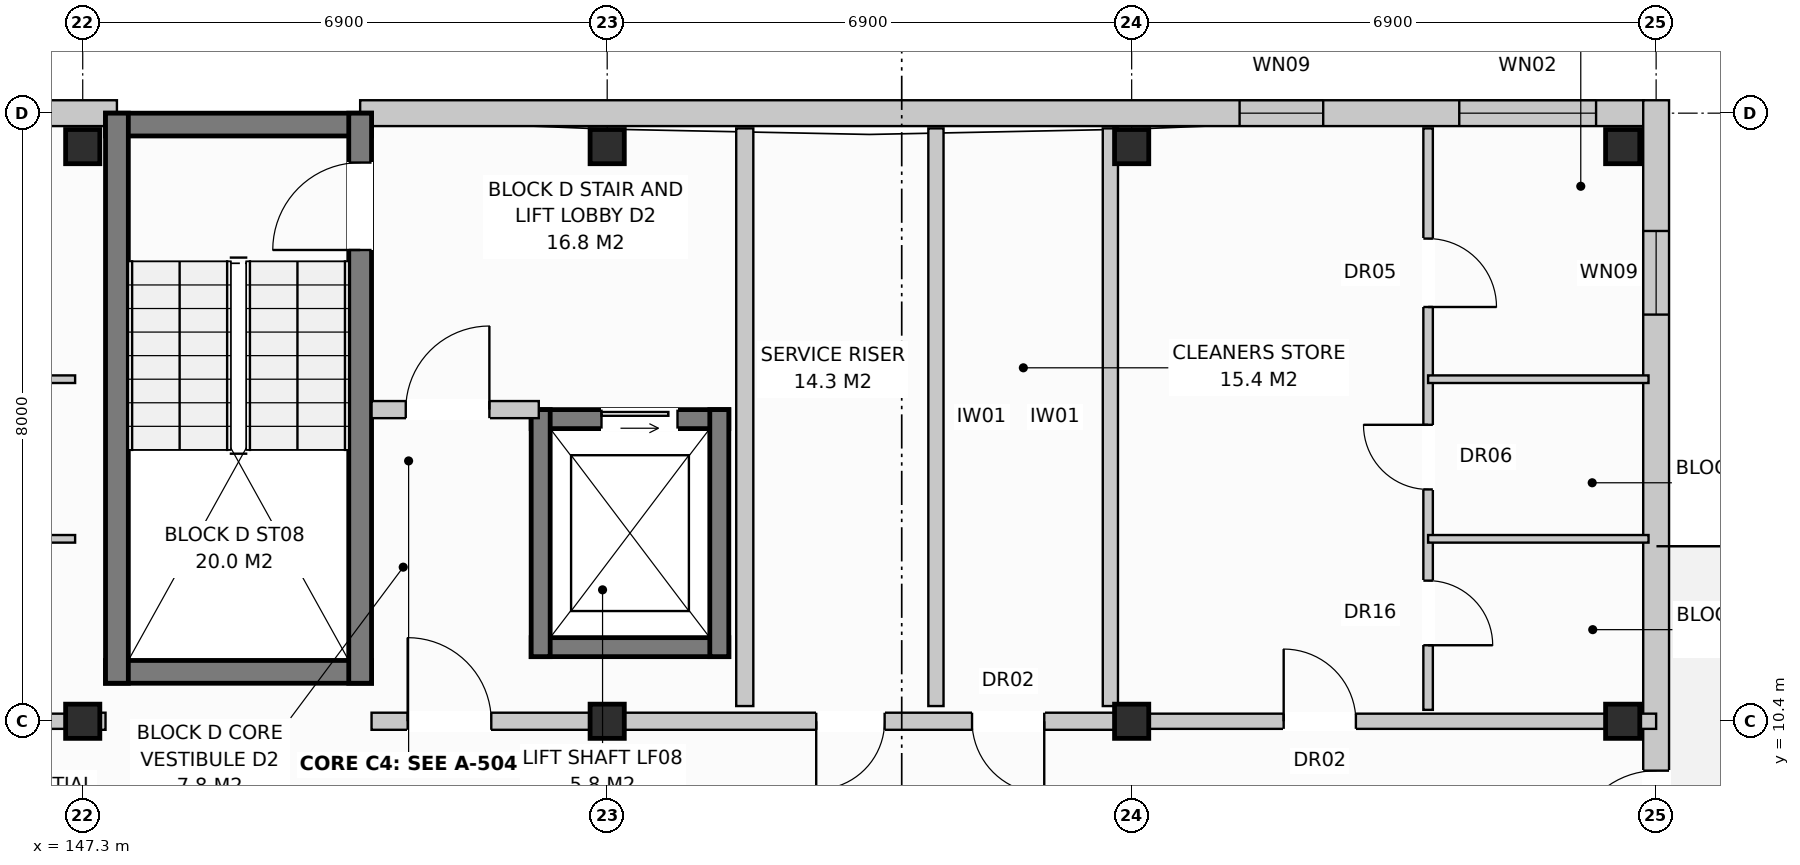
"""IFC4 building model, lengths in metres.
Left out: names, types, materials, properties, quantities, classifications, styles, units other than length and angle.
Written with IfcOpenShell. Run it as: python <this file> out.ifc"""

import sys

from ifc_helpers import new_model, si_unit, direction, frame, frame_2d, origin, origin_with_axes, origin_2d, place, context, subcontext, project, spatial, rectangle, extrude, element, fill, save


model = new_model("IFC4")
c1 = context("Model", 3, precision=1e-05, world=origin(), true_north=direction((0.0, 1.0)))
c2 = subcontext(c1, "Body", "Model", "MODEL_VIEW")
j1 = project(units=[si_unit("LENGTHUNIT", "METRE"), si_unit("PLANEANGLEUNIT", "RADIAN")], contexts=[c1])
p1 = place(None, origin())
s1 = spatial("IfcSite", under=j1, at=p1, CompositionType="ELEMENT")
p2 = place(p1, origin())
s2 = spatial("IfcBuilding", under=s1, at=p2, CompositionType="ELEMENT")
p3 = place(p2, frame((0.0, 0.0, 24.0)))
s3 = spatial("IfcBuildingStorey", under=s2, at=p3, CompositionType="ELEMENT", Elevation=24.0)
for number, where, z_axis, x_axis in (
    (1, (147.3, 10.4, 0.0), (0.0, 0.0, 1.0), (1.0, 0.0, 0.0)),
    (2, (147.3, 17.96, 0.0), (0.0, 0.0, 1.0), (1.0, 0.0, 0.0)),
    (3, (154.2, 10.4, 0.0), (0.0, 0.0, 1.0), (1.0, 0.0, 0.0)),
    (4, (154.2, 17.96, 0.0), (0.0, 0.0, 1.0), (1.0, 0.0, 0.0)),
    (5, (161.1, 10.4, 0.0), (0.0, 0.0, 1.0), (1.0, 0.0, 0.0)),
    (6, (161.1, 17.96, 0.0), (0.0, 0.0, 1.0), (1.0, 0.0, 0.0)),
    (7, (167.56, 10.4, 0.0), (0.0, 0.0, 1.0), (1.0, 0.0, 0.0)),
    (8, (167.56, 17.96, 0.0), (0.0, 0.0, 1.0), (1.0, 0.0, 0.0)),
):
    element("IfcColumn", number, at=place(p3, frame(where, z_axis=z_axis, x_axis=x_axis)), inside=s3, PredefinedType="COLUMN", context=c2, shape_type="SweptSolid", body=[
        extrude(rectangle(XDim=0.45, YDim=0.45, at=origin_2d()), origin(), (0.0, 0.0, 1.0), 3.2),
    ])
p4 = place(p3, frame((130.25, 18.4, 0.0), z_axis=(0.0, 0.0, 1.0), x_axis=(1.0, 0.0, 0.0)))
e9 = element("IfcWall", 9, at=p4, inside=s3, PredefinedType="STANDARD", context=c2, shape_type="SweptSolid", body=[
    extrude(rectangle(XDim=17.5, YDim=0.34, at=frame_2d((8.75, 0.0))), origin(), (0.0, 0.0, 1.0), 2.95),
])
p5 = place(p4, frame((11.921, 0.0, 0.0)))
e10 = element("IfcOpeningElement", 10, at=p5, cuts=e9, PredefinedType="OPENING", context=c2, shape_type="SweptSolid", body=[
    extrude(rectangle(XDim=1.05, YDim=2.12, at=frame_2d((0.525, 1.06))), frame((0.0, 0.182, 0.0), z_axis=(0.0, -1.0, 0.0), x_axis=(1.0, 0.0, 0.0)), (0.0, 0.0, 1.0), 0.364),
])
p6 = place(p4, frame((14.97, 0.0, 0.72)))
e11 = element("IfcOpeningElement", 11, at=p6, cuts=e9, PredefinedType="OPENING", context=c2, shape_type="SweptSolid", body=[
    extrude(rectangle(XDim=1.1, YDim=1.5, at=frame_2d((0.55, 0.75))), frame((0.0, 0.182, 0.0), z_axis=(0.0, -1.0, 0.0), x_axis=(1.0, 0.0, 0.0)), (0.0, 0.0, 1.0), 0.364),
])
p7 = place(p3, frame((150.95, 18.4, 0.0), z_axis=(0.0, 0.0, 1.0), x_axis=(1.0, 0.0, 0.0)))
e12 = element("IfcWall", 12, at=p7, inside=s3, PredefinedType="STANDARD", context=c2, shape_type="SweptSolid", body=[
    extrude(rectangle(XDim=16.89, YDim=0.34, at=frame_2d((8.445, 0.0))), origin(), (0.0, 0.0, 1.0), 2.95),
])
p8 = place(p7, frame((11.57, 0.0, 0.72)))
e13 = element("IfcOpeningElement", 13, at=p8, cuts=e12, PredefinedType="OPENING", context=c2, shape_type="SweptSolid", body=[
    extrude(rectangle(XDim=1.1, YDim=1.5, at=frame_2d((0.55, 0.75))), frame((0.0, 0.182, 0.0), z_axis=(0.0, -1.0, 0.0), x_axis=(1.0, 0.0, 0.0)), (0.0, 0.0, 1.0), 0.364),
])
p9 = place(p7, frame((14.46, 0.0, 0.8)))
e14 = element("IfcOpeningElement", 14, at=p9, cuts=e12, PredefinedType="OPENING", context=c2, shape_type="SweptSolid", body=[
    extrude(rectangle(XDim=1.8, YDim=1.7, at=frame_2d((0.9, 0.85))), frame((0.0, 0.182, 0.0), z_axis=(0.0, -1.0, 0.0), x_axis=(1.0, 0.0, 0.0)), (0.0, 0.0, 1.0), 0.364),
])
p10 = place(p3, frame((168.0, -0.17, 0.0), z_axis=(0.0, 0.0, 1.0), x_axis=(0.0, 1.0, 0.0)))
e15 = element("IfcWall", 15, at=p10, inside=s3, PredefinedType="STANDARD", context=c2, shape_type="SweptSolid", body=[
    extrude(rectangle(XDim=18.74, YDim=0.34, at=frame_2d((9.37, 0.0))), origin(), (0.0, 0.0, 1.0), 2.95),
])
p11 = place(p10, frame((8.82, 0.0, 0.0)))
e16 = element("IfcOpeningElement", 16, at=p11, cuts=e15, PredefinedType="OPENING", context=c2, shape_type="SweptSolid", body=[
    extrude(rectangle(XDim=1.1, YDim=2.1, at=frame_2d((0.55, 1.05))), frame((0.0, 0.182, 0.0), z_axis=(0.0, -1.0, 0.0), x_axis=(1.0, 0.0, 0.0)), (0.0, 0.0, 1.0), 0.364),
])
p12 = place(p10, frame((1.72, 0.0, 0.72)))
e17 = element("IfcOpeningElement", 17, at=p12, cuts=e15, PredefinedType="OPENING", context=c2, shape_type="SweptSolid", body=[
    extrude(rectangle(XDim=1.1, YDim=1.5, at=frame_2d((0.55, 0.75))), frame((0.0, 0.182, 0.0), z_axis=(0.0, -1.0, 0.0), x_axis=(1.0, 0.0, 0.0)), (0.0, 0.0, 1.0), 0.364),
])
p13 = place(p10, frame((15.92, 0.0, 0.72)))
e18 = element("IfcOpeningElement", 18, at=p13, cuts=e15, PredefinedType="OPENING", context=c2, shape_type="SweptSolid", body=[
    extrude(rectangle(XDim=1.1, YDim=1.5, at=frame_2d((0.55, 0.75))), frame((0.0, 0.182, 0.0), z_axis=(0.0, -1.0, 0.0), x_axis=(1.0, 0.0, 0.0)), (0.0, 0.0, 1.0), 0.364),
])
for number, where, z_axis, x_axis in (
    (19, (147.6, 18.25, 0.0), (0.0, 0.0, 1.0), (1.0, 0.0, 0.0)),
    (20, (147.6, 11.05, 0.0), (0.0, 0.0, 1.0), (1.0, 0.0, 0.0)),
):
    element("IfcWall", number, at=place(p3, frame(where, z_axis=z_axis, x_axis=x_axis)), inside=s3, PredefinedType="SHEAR", context=c2, shape_type="SweptSolid", body=[
        extrude(rectangle(XDim=3.5, YDim=0.3, at=frame_2d((1.75, 0.0))), origin(), (0.0, 0.0, 1.0), 2.95),
    ])
p14 = place(p3, frame((147.75, 10.9, 0.0), z_axis=(0.0, 0.0, 1.0), x_axis=(0.0, 1.0, 0.0)))
e21 = element("IfcWall", 21, at=p14, inside=s3, PredefinedType="SHEAR", context=c2, shape_type="SweptSolid", body=[
    extrude(rectangle(XDim=7.5, YDim=0.3, at=frame_2d((3.75, 0.0))), origin(), (0.0, 0.0, 1.0), 2.95),
])
p15 = place(p3, frame((150.95, 10.9, 0.0), z_axis=(0.0, 0.0, 1.0), x_axis=(0.0, 1.0, 0.0)))
e22 = element("IfcWall", 22, at=p15, inside=s3, PredefinedType="SHEAR", context=c2, shape_type="SweptSolid", body=[
    extrude(rectangle(XDim=7.5, YDim=0.3, at=frame_2d((3.75, 0.0))), origin(), (0.0, 0.0, 1.0), 2.95),
])
p16 = place(p15, frame((5.7, 0.0, 0.0)))
e23 = element("IfcOpeningElement", 23, at=p16, cuts=e22, PredefinedType="OPENING", context=c2, shape_type="SweptSolid", body=[
    extrude(rectangle(XDim=1.15, YDim=2.15, at=frame_2d((0.575, 1.075))), frame((0.0, 0.162, 0.0), z_axis=(0.0, -1.0, 0.0), x_axis=(1.0, 0.0, 0.0)), (0.0, 0.0, 1.0), 0.324),
])
p17 = place(p3, frame((153.2, 14.375, 0.0), z_axis=(0.0, 0.0, 1.0), x_axis=(1.0, 0.0, 0.0)))
e24 = element("IfcWall", 24, at=p17, inside=s3, PredefinedType="SHEAR", context=c2, shape_type="SweptSolid", body=[
    extrude(rectangle(XDim=2.6, YDim=0.25, at=frame_2d((1.3, 0.0))), origin(), (0.0, 0.0, 1.0), 2.95),
])
p18 = place(p17, frame((0.925, 0.0, 0.0)))
e25 = element("IfcOpeningElement", 25, at=p18, cuts=e24, PredefinedType="OPENING", context=c2, shape_type="SweptSolid", body=[
    extrude(rectangle(XDim=1.0, YDim=2.1, at=frame_2d((0.5, 1.05))), frame((0.0, 0.137, 0.0), z_axis=(0.0, -1.0, 0.0), x_axis=(1.0, 0.0, 0.0)), (0.0, 0.0, 1.0), 0.274),
])
p19 = place(p3, frame((153.2, 11.375, 0.0), z_axis=(0.0, 0.0, 1.0), x_axis=(1.0, 0.0, 0.0)))
e26 = element("IfcWall", 26, at=p19, inside=s3, PredefinedType="SHEAR", context=c2, shape_type="SweptSolid", body=[
    extrude(rectangle(XDim=2.6, YDim=0.25, at=frame_2d((1.3, 0.0))), origin(), (0.0, 0.0, 1.0), 2.95),
])
for number, where, z_axis, x_axis in (
    (27, (153.325, 11.25, 0.0), (0.0, 0.0, 1.0), (0.0, 1.0, 0.0)),
    (28, (155.675, 11.25, 0.0), (0.0, 0.0, 1.0), (0.0, 1.0, 0.0)),
):
    element("IfcWall", number, at=place(p3, frame(where, z_axis=z_axis, x_axis=x_axis)), inside=s3, PredefinedType="SHEAR", context=c2, shape_type="SweptSolid", body=[
        extrude(rectangle(XDim=3.25, YDim=0.25, at=frame_2d((1.625, 0.0))), origin(), (0.0, 0.0, 1.0), 2.95),
    ])
p20 = place(p3, frame((156.01, 10.6, 0.0), z_axis=(0.0, 0.0, 1.0), x_axis=(0.0, 1.0, 0.0)))
e29 = element("IfcWall", 29, at=p20, inside=s3, PredefinedType="PARTITIONING", context=c2, shape_type="SweptSolid", body=[
    extrude(rectangle(XDim=7.6, YDim=0.225, at=frame_2d((3.8, 0.0))), origin(), (0.0, 0.0, 1.0), 2.59),
])
p21 = place(p3, frame((151.1, 14.5, 0.0), z_axis=(0.0, 0.0, 1.0), x_axis=(1.0, 0.0, 0.0)))
e30 = element("IfcWall", 30, at=p21, inside=s3, PredefinedType="PARTITIONING", context=c2, shape_type="SweptSolid", body=[
    extrude(rectangle(XDim=2.2, YDim=0.225, at=frame_2d((1.1, 0.0))), origin(), (0.0, 0.0, 1.0), 2.95),
])
p22 = place(p21, frame((0.45, 0.0, 0.0)))
e31 = element("IfcOpeningElement", 31, at=p22, cuts=e30, PredefinedType="OPENING", context=c2, shape_type="SweptSolid", body=[
    extrude(rectangle(XDim=1.1, YDim=2.15, at=frame_2d((0.55, 1.075))), frame((0.0, 0.125, 0.0), z_axis=(0.0, -1.0, 0.0), x_axis=(1.0, 0.0, 0.0)), (0.0, 0.0, 1.0), 0.249),
])
p23 = place(p3, frame((147.3, 10.4, 0.0), z_axis=(0.0, 0.0, 1.0), x_axis=(1.0, 0.0, 0.0)))
e32 = element("IfcWall", 32, at=p23, inside=s3, PredefinedType="PARTITIONING", context=c2, shape_type="SweptSolid", body=[
    extrude(rectangle(XDim=0.3, YDim=0.225, at=frame_2d((0.15, 0.0))), origin(), (0.0, 0.0, 1.0), 2.95),
])
p24 = place(p3, frame((158.525, 10.6, 0.0), z_axis=(0.0, 0.0, 1.0), x_axis=(0.0, 1.0, 0.0)))
e33 = element("IfcWall", 33, at=p24, inside=s3, PredefinedType="PARTITIONING", context=c2, shape_type="SweptSolid", body=[
    extrude(rectangle(XDim=7.6, YDim=0.2, at=frame_2d((3.8, 0.0))), origin(), (0.0, 0.0, 1.0), 2.59),
])
p25 = place(p3, frame((160.82, 10.6, 0.0), z_axis=(0.0, 0.0, 1.0), x_axis=(0.0, 1.0, 0.0)))
e34 = element("IfcWall", 34, at=p25, inside=s3, PredefinedType="PARTITIONING", context=c2, shape_type="SweptSolid", body=[
    extrude(rectangle(XDim=7.6, YDim=0.2, at=frame_2d((3.8, 0.0))), origin(), (0.0, 0.0, 1.0), 2.39),
])
p26 = place(p3, frame((151.1, 10.4, 0.0), z_axis=(0.0, 0.0, 1.0), x_axis=(1.0, 0.0, 0.0)))
e35 = element("IfcWall", 35, at=p26, inside=s3, PredefinedType="PARTITIONING", context=c2, shape_type="SweptSolid", body=[
    extrude(rectangle(XDim=10.0, YDim=0.225, at=frame_2d((5.0, 0.0))), origin(), (0.0, 0.0, 1.0), 2.39),
])
p27 = place(p26, frame((0.475, 0.0, 0.0)))
e36 = element("IfcOpeningElement", 36, at=p27, cuts=e35, PredefinedType="OPENING", context=c2, shape_type="SweptSolid", body=[
    extrude(rectangle(XDim=1.1, YDim=2.15, at=frame_2d((0.55, 1.075))), frame((0.0, 0.125, 0.0), z_axis=(0.0, -1.0, 0.0), x_axis=(1.0, 0.0, 0.0)), (0.0, 0.0, 1.0), 0.249),
])
p28 = place(p26, frame((5.85, 0.0, 0.0)))
e37 = element("IfcOpeningElement", 37, at=p28, cuts=e35, PredefinedType="OPENING", context=c2, shape_type="SweptSolid", body=[
    extrude(rectangle(XDim=0.9, YDim=2.1, at=frame_2d((0.45, 1.05))), frame((0.0, 0.125, 0.0), z_axis=(0.0, -1.0, 0.0), x_axis=(1.0, 0.0, 0.0)), (0.0, 0.0, 1.0), 0.249),
])
p29 = place(p26, frame((7.9, 0.0, 0.0)))
e38 = element("IfcOpeningElement", 38, at=p29, cuts=e35, PredefinedType="OPENING", context=c2, shape_type="SweptSolid", body=[
    extrude(rectangle(XDim=0.95, YDim=2.15, at=frame_2d((0.475, 1.075))), frame((0.0, 0.125, 0.0), z_axis=(0.0, -1.0, 0.0), x_axis=(1.0, 0.0, 0.0)), (0.0, 0.0, 1.0), 0.249),
])
p30 = place(p3, frame((140.4, 10.4, 0.0), z_axis=(0.0, 0.0, 1.0), x_axis=(1.0, 0.0, 0.0)))
e39 = element("IfcWall", 39, at=p30, inside=s3, PredefinedType="PARTITIONING", context=c2, shape_type="SweptSolid", body=[
    extrude(rectangle(XDim=6.9, YDim=0.2, at=frame_2d((3.45, 0.0))), origin(), (0.0, 0.0, 1.0), 2.39),
])
p31 = place(p30, frame((2.0, 0.0, 0.0)))
e40 = element("IfcOpeningElement", 40, at=p31, cuts=e39, PredefinedType="OPENING", context=c2, shape_type="SweptSolid", body=[
    extrude(rectangle(XDim=0.95, YDim=2.15, at=frame_2d((0.475, 1.075))), frame((0.0, 0.112, 0.0), z_axis=(0.0, -1.0, 0.0), x_axis=(1.0, 0.0, 0.0)), (0.0, 0.0, 1.0), 0.224),
])
for number, where, z_axis, x_axis in (
    (41, (144.3, 12.8, 0.0), (0.0, 0.0, 1.0), (1.0, 0.0, 0.0)),
    (42, (144.3, 14.9, 0.0), (0.0, 0.0, 1.0), (1.0, 0.0, 0.0)),
):
    element("IfcWall", number, at=place(p3, frame(where, z_axis=z_axis, x_axis=x_axis)), inside=s3, PredefinedType="PARTITIONING", context=c2, shape_type="SweptSolid", body=[
        extrude(rectangle(XDim=2.9, YDim=0.1, at=frame_2d((1.45, 0.0))), origin(), (0.0, 0.0, 1.0), 2.95),
    ])
p32 = place(p3, frame((161.1, 10.4, 0.0), z_axis=(0.0, 0.0, 1.0), x_axis=(1.0, 0.0, 0.0)))
e43 = element("IfcWall", 43, at=p32, inside=s3, PredefinedType="PARTITIONING", context=c2, shape_type="SweptSolid", body=[
    extrude(rectangle(XDim=6.9, YDim=0.2, at=frame_2d((3.45, 0.0))), origin(), (0.0, 0.0, 1.0), 2.39),
])
p33 = place(p32, frame((2.0, 0.0, 0.0)))
e44 = element("IfcOpeningElement", 44, at=p33, cuts=e43, PredefinedType="OPENING", context=c2, shape_type="SweptSolid", body=[
    extrude(rectangle(XDim=0.95, YDim=2.15, at=frame_2d((0.475, 1.075))), frame((0.0, 0.112, 0.0), z_axis=(0.0, -1.0, 0.0), x_axis=(1.0, 0.0, 0.0)), (0.0, 0.0, 1.0), 0.224),
])
p34 = place(p3, frame((165.0, 10.55, 0.0), z_axis=(0.0, 0.0, 1.0), x_axis=(0.0, 1.0, 0.0)))
e45 = element("IfcWall", 45, at=p34, inside=s3, PredefinedType="PARTITIONING", context=c2, shape_type="SweptSolid", body=[
    extrude(rectangle(XDim=7.65, YDim=0.125, at=frame_2d((3.825, 0.0))), origin(), (0.0, 0.0, 1.0), 2.95),
])
p35 = place(p34, frame((0.85, 0.0, 0.0)))
e46 = element("IfcOpeningElement", 46, at=p35, cuts=e45, PredefinedType="OPENING", context=c2, shape_type="SweptSolid", body=[
    extrude(rectangle(XDim=0.85, YDim=2.1, at=frame_2d((0.425, 1.05))), frame((0.0, 0.074, 0.0), z_axis=(0.0, -1.0, 0.0), x_axis=(1.0, 0.0, 0.0)), (0.0, 0.0, 1.0), 0.149),
])
p36 = place(p34, frame((2.9, 0.0, 0.0)))
e47 = element("IfcOpeningElement", 47, at=p36, cuts=e45, PredefinedType="OPENING", context=c2, shape_type="SweptSolid", body=[
    extrude(rectangle(XDim=0.85, YDim=2.05, at=frame_2d((0.425, 1.025))), frame((0.0, 0.074, 0.0), z_axis=(0.0, -1.0, 0.0), x_axis=(1.0, 0.0, 0.0)), (0.0, 0.0, 1.0), 0.149),
])
p37 = place(p34, frame((5.3, 0.0, 0.0)))
e48 = element("IfcOpeningElement", 48, at=p37, cuts=e45, PredefinedType="OPENING", context=c2, shape_type="SweptSolid", body=[
    extrude(rectangle(XDim=0.9, YDim=2.1, at=frame_2d((0.45, 1.05))), frame((0.0, 0.074, 0.0), z_axis=(0.0, -1.0, 0.0), x_axis=(1.0, 0.0, 0.0)), (0.0, 0.0, 1.0), 0.149),
])
for number, where, z_axis, x_axis in (
    (49, (165.0, 12.8, 0.0), (0.0, 0.0, 1.0), (1.0, 0.0, 0.0)),
    (50, (165.0, 14.9, 0.0), (0.0, 0.0, 1.0), (1.0, 0.0, 0.0)),
):
    element("IfcWall", number, at=place(p3, frame(where, z_axis=z_axis, x_axis=x_axis)), inside=s3, PredefinedType="PARTITIONING", context=c2, shape_type="SweptSolid", body=[
        extrude(rectangle(XDim=2.9, YDim=0.1, at=frame_2d((1.45, 0.0))), origin(), (0.0, 0.0, 1.0), 2.95),
    ])
p38 = place(p8, origin_with_axes())
e51 = element("IfcWindow", 51, at=p38, inside=s3, PartitioningType="SINGLE_PANEL", PredefinedType="WINDOW", context=c2, shape_type="SweptSolid", body=[
    extrude(rectangle(XDim=1.1, YDim=1.5, at=frame_2d((0.55, 0.75))), frame((0.0, 0.03, 0.0), z_axis=(0.0, -1.0, 0.0), x_axis=(1.0, 0.0, 0.0)), (0.0, 0.0, 1.0), 0.06),
])
fill(e13, e51)
p39 = place(p9, origin_with_axes())
e52 = element("IfcWindow", 52, at=p39, inside=s3, PartitioningType="SINGLE_PANEL", PredefinedType="WINDOW", context=c2, shape_type="SweptSolid", body=[
    extrude(rectangle(XDim=1.8, YDim=1.7, at=frame_2d((0.9, 0.85))), frame((0.0, 0.03, 0.0), z_axis=(0.0, -1.0, 0.0), x_axis=(1.0, 0.0, 0.0)), (0.0, 0.0, 1.0), 0.06),
])
fill(e14, e52)
p40 = place(p11, origin_with_axes())
e53 = element("IfcDoor", 53, at=p40, inside=s3, OperationType="SINGLE_SWING_LEFT", PredefinedType="DOOR", context=c2, shape_type="SweptSolid", body=[
    extrude(rectangle(XDim=1.1, YDim=2.1, at=frame_2d((0.55, 1.05))), frame((0.0, 0.025, 0.0), z_axis=(0.0, -1.0, 0.0), x_axis=(1.0, 0.0, 0.0)), (0.0, 0.0, 1.0), 0.05),
])
fill(e16, e53)
p41 = place(p13, origin_with_axes())
e54 = element("IfcWindow", 54, at=p41, inside=s3, PartitioningType="SINGLE_PANEL", PredefinedType="WINDOW", context=c2, shape_type="SweptSolid", body=[
    extrude(rectangle(XDim=1.1, YDim=1.5, at=frame_2d((0.55, 0.75))), frame((0.0, 0.03, 0.0), z_axis=(0.0, -1.0, 0.0), x_axis=(1.0, 0.0, 0.0)), (0.0, 0.0, 1.0), 0.06),
])
fill(e18, e54)
p42 = place(p16, origin_with_axes())
e55 = element("IfcDoor", 55, at=p42, inside=s3, OperationType="SINGLE_SWING_LEFT", PredefinedType="DOOR", context=c2, shape_type="SweptSolid", body=[
    extrude(rectangle(XDim=1.15, YDim=2.15, at=frame_2d((0.575, 1.075))), frame((0.0, 0.025, 0.0), z_axis=(0.0, -1.0, 0.0), x_axis=(1.0, 0.0, 0.0)), (0.0, 0.0, 1.0), 0.05),
])
fill(e23, e55)
p43 = place(p18, origin_with_axes())
e56 = element("IfcDoor", 56, at=p43, inside=s3, OperationType="SLIDING_TO_LEFT", PredefinedType="DOOR", context=c2, shape_type="SweptSolid", body=[
    extrude(rectangle(XDim=1.0, YDim=2.1, at=frame_2d((0.5, 1.05))), frame((0.0, 0.025, 0.0), z_axis=(0.0, -1.0, 0.0), x_axis=(1.0, 0.0, 0.0)), (0.0, 0.0, 1.0), 0.05),
])
fill(e25, e56)
p44 = place(p22, origin_with_axes())
e57 = element("IfcDoor", 57, at=p44, inside=s3, OperationType="SINGLE_SWING_RIGHT", PredefinedType="DOOR", context=c2, shape_type="SweptSolid", body=[
    extrude(rectangle(XDim=1.1, YDim=2.15, at=frame_2d((0.55, 1.075))), frame((0.0, 0.025, 0.0), z_axis=(0.0, -1.0, 0.0), x_axis=(1.0, 0.0, 0.0)), (0.0, 0.0, 1.0), 0.05),
])
fill(e31, e57)
p45 = place(p27, origin_with_axes())
e58 = element("IfcDoor", 58, at=p45, inside=s3, OperationType="SINGLE_SWING_LEFT", PredefinedType="DOOR", context=c2, shape_type="SweptSolid", body=[
    extrude(rectangle(XDim=1.1, YDim=2.15, at=frame_2d((0.55, 1.075))), frame((0.0, 0.025, 0.0), z_axis=(0.0, -1.0, 0.0), x_axis=(1.0, 0.0, 0.0)), (0.0, 0.0, 1.0), 0.05),
])
fill(e36, e58)
p46 = place(p28, frame((0.9, 0.0, 0.0), z_axis=(0.0, 0.0, 1.0), x_axis=(-1.0, 0.0, 0.0)))
e59 = element("IfcDoor", 59, at=p46, inside=s3, OperationType="SINGLE_SWING_LEFT", PredefinedType="DOOR", context=c2, shape_type="SweptSolid", body=[
    extrude(rectangle(XDim=0.9, YDim=2.1, at=frame_2d((0.45, 1.05))), frame((0.0, 0.025, 0.0), z_axis=(0.0, -1.0, 0.0), x_axis=(1.0, 0.0, 0.0)), (0.0, 0.0, 1.0), 0.05),
])
fill(e37, e59)
p47 = place(p29, frame((0.95, 0.0, 0.0), z_axis=(0.0, 0.0, 1.0), x_axis=(-1.0, 0.0, 0.0)))
e60 = element("IfcDoor", 60, at=p47, inside=s3, OperationType="SINGLE_SWING_RIGHT", PredefinedType="DOOR", context=c2, shape_type="SweptSolid", body=[
    extrude(rectangle(XDim=0.95, YDim=2.15, at=frame_2d((0.475, 1.075))), frame((0.0, 0.025, 0.0), z_axis=(0.0, -1.0, 0.0), x_axis=(1.0, 0.0, 0.0)), (0.0, 0.0, 1.0), 0.05),
])
fill(e38, e60)
p48 = place(p33, origin_with_axes())
e61 = element("IfcDoor", 61, at=p48, inside=s3, OperationType="SINGLE_SWING_LEFT", PredefinedType="DOOR", context=c2, shape_type="SweptSolid", body=[
    extrude(rectangle(XDim=0.95, YDim=2.15, at=frame_2d((0.475, 1.075))), frame((0.0, 0.025, 0.0), z_axis=(0.0, -1.0, 0.0), x_axis=(1.0, 0.0, 0.0)), (0.0, 0.0, 1.0), 0.05),
])
fill(e44, e61)
p49 = place(p35, frame((0.85, 0.0, 0.0), z_axis=(0.0, 0.0, 1.0), x_axis=(-1.0, 0.0, 0.0)))
e62 = element("IfcDoor", 62, at=p49, inside=s3, OperationType="SINGLE_SWING_LEFT", PredefinedType="DOOR", context=c2, shape_type="SweptSolid", body=[
    extrude(rectangle(XDim=0.85, YDim=2.1, at=frame_2d((0.425, 1.05))), frame((0.0, 0.025, 0.0), z_axis=(0.0, -1.0, 0.0), x_axis=(1.0, 0.0, 0.0)), (0.0, 0.0, 1.0), 0.05),
])
fill(e46, e62)
p50 = place(p36, origin_with_axes())
e63 = element("IfcDoor", 63, at=p50, inside=s3, OperationType="SINGLE_SWING_RIGHT", PredefinedType="DOOR", context=c2, shape_type="SweptSolid", body=[
    extrude(rectangle(XDim=0.85, YDim=2.05, at=frame_2d((0.425, 1.025))), frame((0.0, 0.025, 0.0), z_axis=(0.0, -1.0, 0.0), x_axis=(1.0, 0.0, 0.0)), (0.0, 0.0, 1.0), 0.05),
])
fill(e47, e63)
p51 = place(p37, frame((0.9, 0.0, 0.0), z_axis=(0.0, 0.0, 1.0), x_axis=(-1.0, 0.0, 0.0)))
e64 = element("IfcDoor", 64, at=p51, inside=s3, OperationType="SINGLE_SWING_LEFT", PredefinedType="DOOR", context=c2, shape_type="SweptSolid", body=[
    extrude(rectangle(XDim=0.9, YDim=2.1, at=frame_2d((0.45, 1.05))), frame((0.0, 0.025, 0.0), z_axis=(0.0, -1.0, 0.0), x_axis=(1.0, 0.0, 0.0)), (0.0, 0.0, 1.0), 0.05),
])
fill(e48, e64)
save(model, sys.argv[1])
